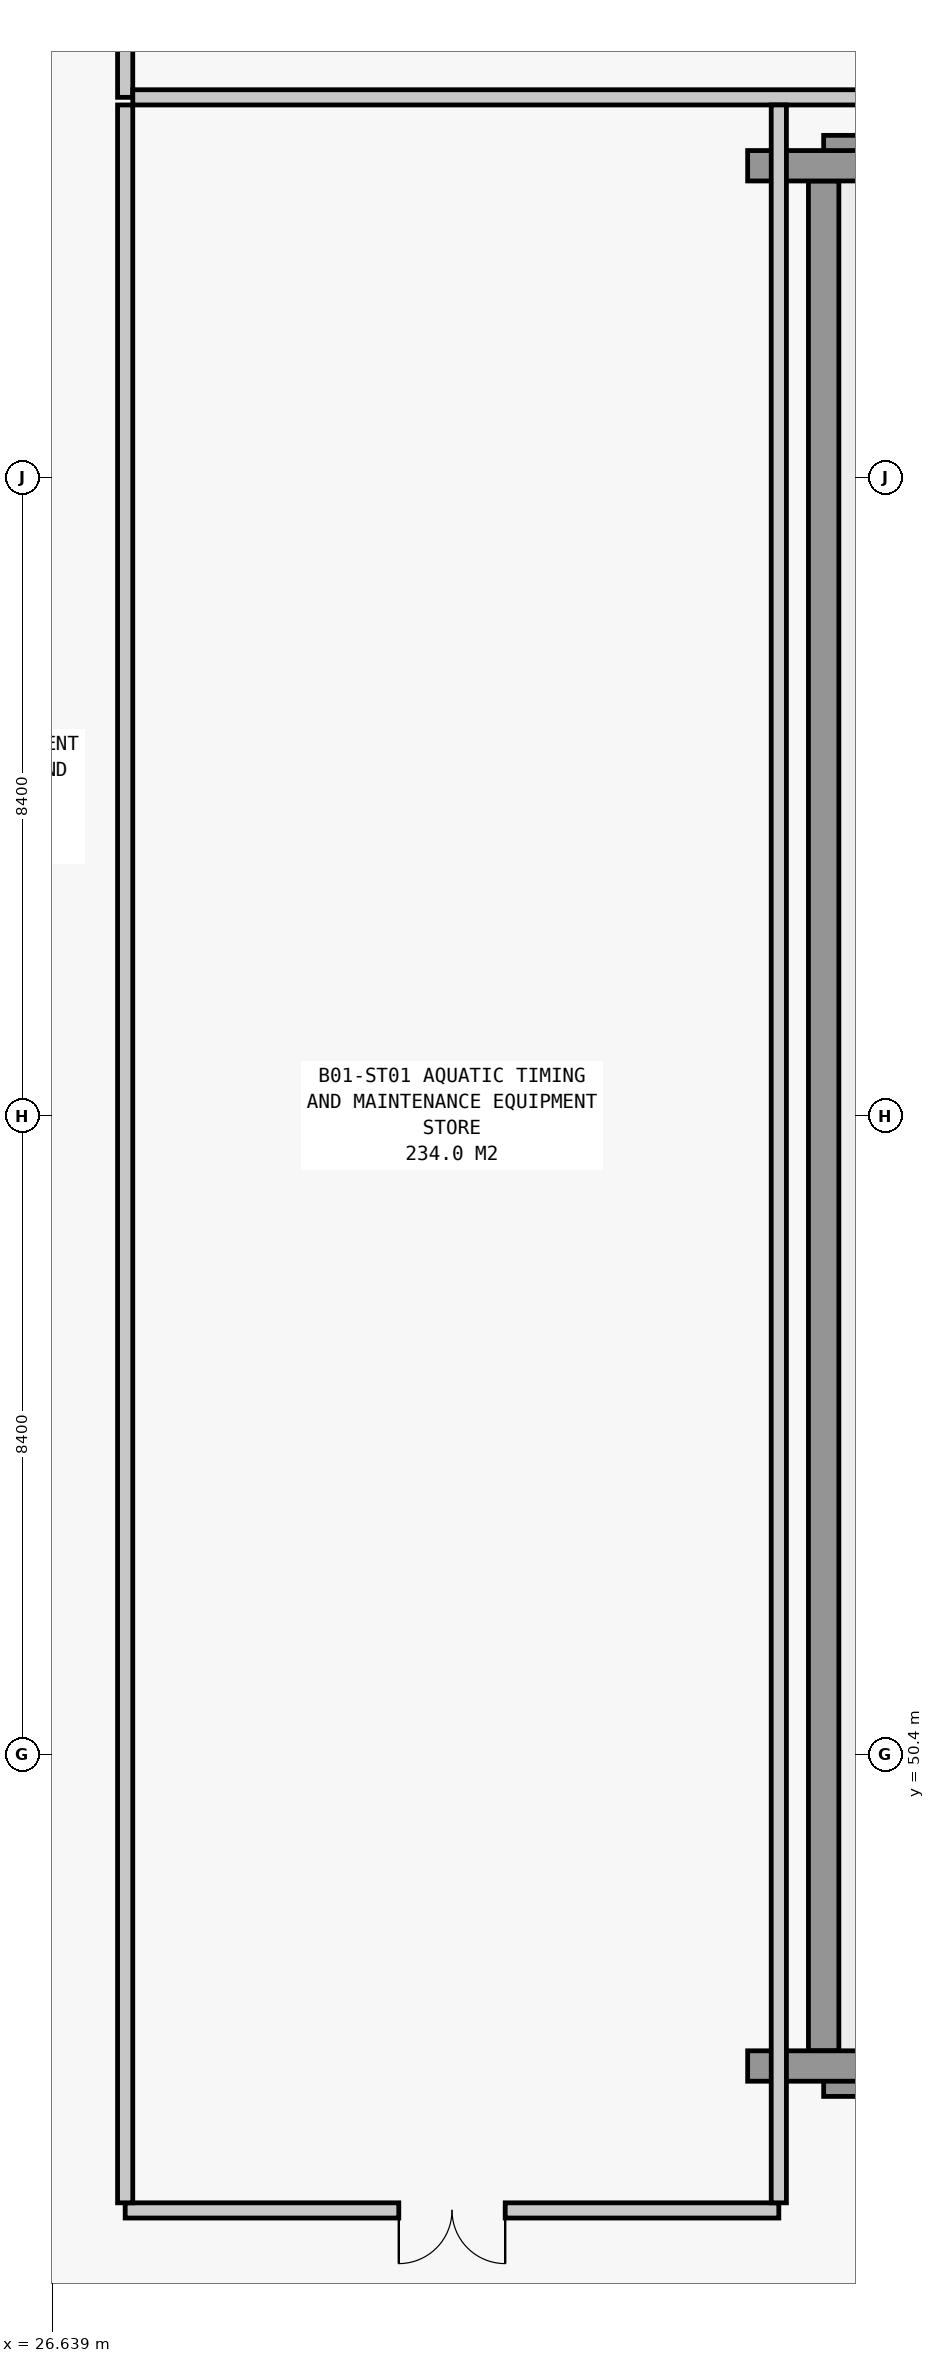
"""IFC4 building model, lengths in metres.
Left out: names, types, materials, properties, quantities, classifications, styles, units other than length and angle.
Written with IfcOpenShell. Run it as: python <this file> out.ifc"""

import sys

from ifc_helpers import new_model, si_unit, direction, frame, frame_2d, origin, place, context, subcontext, project, spatial, rectangle, extrude, element, fill, save


model = new_model("IFC4")
c1 = context("Model", 3, precision=1e-05, world=origin(), true_north=direction((0.0, 1.0)))
c2 = subcontext(c1, "Body", "Model", "MODEL_VIEW")
j1 = project(units=[si_unit("LENGTHUNIT", "METRE"), si_unit("PLANEANGLEUNIT", "RADIAN")], contexts=[c1])
p1 = place(None, origin())
s1 = spatial("IfcSite", under=j1, at=p1, CompositionType="ELEMENT")
p2 = place(p1, origin())
s2 = spatial("IfcBuilding", under=s1, at=p2, CompositionType="ELEMENT")
p3 = place(p2, frame((0.0, 0.0, -4.8)))
s3 = spatial("IfcBuildingStorey", under=s2, at=p3, CompositionType="ELEMENT", Elevation=-4.8)
for number, where, z_axis, x_axis in (
    (1, (36.79, 46.1, 1.8), (0.0, 0.0, 1.0), (1.0, 0.0, 0.0)),
    (2, (87.21, 71.5, 1.8), (0.0, 0.0, 1.0), (-1.0, 0.0, 0.0)),
):
    element("IfcWall", number, at=place(p3, frame(where, z_axis=z_axis, x_axis=x_axis)), inside=s3, PredefinedType="STANDARD", context=c2, shape_type="SweptSolid", body=[
        extrude(rectangle(XDim=50.42, YDim=0.4, at=frame_2d((25.21, 0.0))), origin(), (0.0, 0.0, 1.0), 2.7),
    ])
p4 = place(p3, frame((36.79, 71.1, 1.8), z_axis=(0.0, 0.0, 1.0), x_axis=(0.0, -1.0, 0.0)))
e3 = element("IfcWall", 3, at=p4, inside=s3, PredefinedType="STANDARD", context=c2, shape_type="SweptSolid", body=[
    extrude(rectangle(XDim=24.6, YDim=0.4, at=frame_2d((12.3, 0.0))), origin(), (0.0, 0.0, 1.0), 2.7),
])
for number, where, z_axis, x_axis in (
    (4, (35.79, 46.3, 0.0), (0.0, 0.0, 1.0), (1.0, 0.0, 0.0)),
    (5, (35.79, 71.3, 0.0), (0.0, 0.0, 1.0), (1.0, 0.0, 0.0)),
):
    element("IfcWall", number, at=place(p3, frame(where, z_axis=z_axis, x_axis=x_axis)), inside=s3, PredefinedType="STANDARD", context=c2, shape_type="SweptSolid", body=[
        extrude(rectangle(XDim=2.4, YDim=0.4, at=frame_2d((1.2, 0.0))), origin(), (0.0, 0.0, 1.0), 1.3),
    ])
p5 = place(p3, frame((27.6, 72.2, 0.0), z_axis=(0.0, 0.0, 1.0), x_axis=(0.0, 1.0, 0.0)))
e6 = element("IfcWall", 6, at=p5, inside=s3, PredefinedType="PARTITIONING", context=c2, shape_type="SweptSolid", body=[
    extrude(rectangle(XDim=7.4, YDim=0.2, at=frame_2d((3.7, 0.0))), origin(), (0.0, 0.0, 1.0), 3.53),
])
p6 = place(p5, frame((3.0, 0.0, 0.0)))
e7 = element("IfcOpeningElement", 7, at=p6, cuts=e6, PredefinedType="OPENING", context=c2, shape_type="SweptSolid", body=[
    extrude(rectangle(XDim=1.4, YDim=2.2, at=frame_2d((0.7, 1.1))), frame((0.0, 0.115, 0.0), z_axis=(0.0, -1.0, 0.0), x_axis=(1.0, 0.0, 0.0)), (0.0, 0.0, 1.0), 0.23),
])
p7 = place(p3, frame((27.7, 72.2, 0.0), z_axis=(0.0, 0.0, 1.0), x_axis=(1.0, 0.0, 0.0)))
e8 = element("IfcWall", 8, at=p7, inside=s3, PredefinedType="PARTITIONING", context=c2, shape_type="SweptSolid", body=[
    extrude(rectangle(XDim=26.3, YDim=0.2, at=frame_2d((13.15, 0.0))), origin(), (0.0, 0.0, 1.0), 4.5),
])
p8 = place(p3, frame((27.6, 44.4, 0.0), z_axis=(0.0, 0.0, 1.0), x_axis=(1.0, 0.0, 0.0)))
e9 = element("IfcWall", 9, at=p8, inside=s3, PredefinedType="PARTITIONING", context=c2, shape_type="SweptSolid", body=[
    extrude(rectangle(XDim=8.6, YDim=0.2, at=frame_2d((4.3, 0.0))), origin(), (0.0, 0.0, 1.0), 4.5),
])
p9 = place(p8, frame((3.6, 0.0, 0.0)))
e10 = element("IfcOpeningElement", 10, at=p9, cuts=e9, PredefinedType="OPENING", context=c2, shape_type="SweptSolid", body=[
    extrude(rectangle(XDim=1.4, YDim=2.2, at=frame_2d((0.7, 1.1))), frame((0.0, 0.115, 0.0), z_axis=(0.0, -1.0, 0.0), x_axis=(1.0, 0.0, 0.0)), (0.0, 0.0, 1.0), 0.23),
])
for number, where, z_axis, x_axis in (
    (11, (27.6, 44.5, 0.0), (0.0, 0.0, 1.0), (0.0, 1.0, 0.0)),
    (12, (36.2, 44.5, 0.0), (0.0, 0.0, 1.0), (0.0, 1.0, 0.0)),
):
    element("IfcWall", number, at=place(p3, frame(where, z_axis=z_axis, x_axis=x_axis)), inside=s3, PredefinedType="PARTITIONING", context=c2, shape_type="SweptSolid", body=[
        extrude(rectangle(XDim=27.6, YDim=0.2, at=frame_2d((13.8, 0.0))), origin(), (0.0, 0.0, 1.0), 4.5),
    ])
p10 = place(p9, frame((1.4, 0.0, 0.0), z_axis=(0.0, 0.0, 1.0), x_axis=(-1.0, 0.0, 0.0)))
e13 = element("IfcDoor", 13, at=p10, inside=s3, OperationType="DOUBLE_DOOR_SINGLE_SWING", PredefinedType="DOOR", context=c2, shape_type="SweptSolid", body=[
    extrude(rectangle(XDim=1.4, YDim=2.2, at=frame_2d((0.7, 1.1))), frame((0.0, 0.025, 0.0), z_axis=(0.0, -1.0, 0.0), x_axis=(1.0, 0.0, 0.0)), (0.0, 0.0, 1.0), 0.05),
])
fill(e10, e13)
save(model, sys.argv[1])
